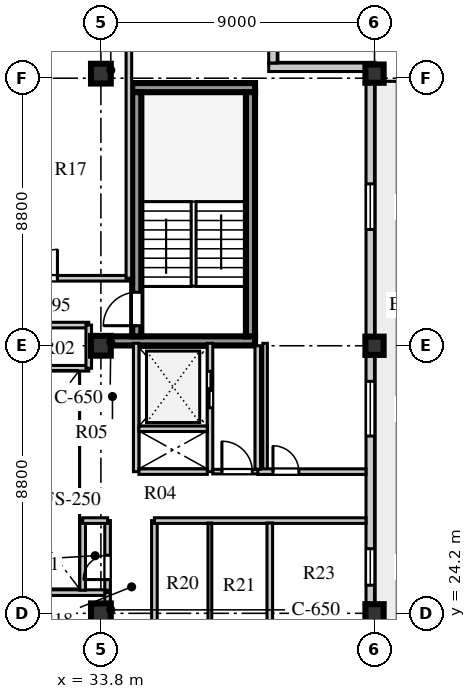
"""IFC4 building model, lengths in metres.
Left out: names, types, materials, properties, quantities, classifications, styles, units other than length and angle.
Written with IfcOpenShell. Run it as: python <this file> out.ifc"""

import sys

from ifc_helpers import new_model, si_unit, direction, frame, frame_2d, origin, origin_2d, place, context, subcontext, project, spatial, rectangle, extrude, element, fill, save


model = new_model("IFC4")
c1 = context("Model", 3, precision=1e-05, world=origin(), true_north=direction((0.0, 1.0)))
c2 = subcontext(c1, "Body", "Model", "MODEL_VIEW")
j1 = project(units=[si_unit("LENGTHUNIT", "METRE"), si_unit("PLANEANGLEUNIT", "RADIAN")], contexts=[c1])
p1 = place(None, origin())
s1 = spatial("IfcSite", under=j1, at=p1, CompositionType="ELEMENT")
p2 = place(p1, origin())
s2 = spatial("IfcBuilding", under=s1, at=p2, CompositionType="ELEMENT")
p3 = place(p2, frame((0.0, 0.0, 342.9)))
s3 = spatial("IfcBuildingStorey", under=s2, at=p3, CompositionType="ELEMENT", Elevation=342.9)
p4 = place(p3, frame((34.125, 33.16, 0.0), z_axis=(0.0, 0.0, 1.0), x_axis=(1.0, 0.0, 0.0)))
e1 = element("IfcWall", 1, at=p4, inside=s3, PredefinedType="SHEAR", context=c2, shape_type="SweptSolid", body=[
    extrude(rectangle(XDim=4.745, YDim=0.3, at=frame_2d((2.373, 0.0))), origin(), (0.0, 0.0, 1.0), 3.55),
])
p5 = place(p3, frame((34.83, 41.49, 0.0), z_axis=(0.0, 0.0, 1.0), x_axis=(1.0, 0.0, 0.0)))
e2 = element("IfcWall", 2, at=p5, inside=s3, PredefinedType="SHEAR", context=c2, shape_type="SweptSolid", body=[
    extrude(rectangle(XDim=4.04, YDim=0.3, at=frame_2d((2.02, 0.0))), origin(), (0.0, 0.0, 1.0), 3.55),
])
p6 = place(p3, frame((34.98, 33.31, 0.0), z_axis=(0.0, 0.0, 1.0), x_axis=(0.0, 1.0, 0.0)))
e3 = element("IfcWall", 3, at=p6, inside=s3, PredefinedType="SHEAR", context=c2, shape_type="SweptSolid", body=[
    extrude(rectangle(XDim=8.03, YDim=0.3, at=frame_2d((4.015, 0.0))), origin(), (0.0, 0.0, 1.0), 3.55),
])
p7 = place(p6, frame((0.35, 0.0, 0.0)))
e4 = element("IfcOpeningElement", 4, at=p7, cuts=e3, PredefinedType="OPENING", context=c2, shape_type="SweptSolid", body=[
    extrude(rectangle(XDim=1.1, YDim=2.1, at=frame_2d((0.55, 1.05))), frame((0.0, 0.16, 0.0), z_axis=(0.0, -1.0, 0.0), x_axis=(1.0, 0.0, 0.0)), (0.0, 0.0, 1.0), 0.32),
])
p8 = place(p3, frame((38.72, 33.31, 0.0), z_axis=(0.0, 0.0, 1.0), x_axis=(0.0, 1.0, 0.0)))
e5 = element("IfcWall", 5, at=p8, inside=s3, PredefinedType="SHEAR", context=c2, shape_type="SweptSolid", body=[
    extrude(rectangle(XDim=8.03, YDim=0.3, at=frame_2d((4.015, 0.0))), origin(), (0.0, 0.0, 1.0), 3.55),
])
for number, where, z_axis, x_axis in (
    (6, (33.8, 24.2, 0.0), (0.0, 0.0, 1.0), (1.0, 0.0, 0.0)),
    (7, (33.8, 33.0, 0.0), (0.0, 0.0, 1.0), (1.0, 0.0, 0.0)),
    (8, (33.8, 41.95, 0.0), (0.0, 0.0, 1.0), (1.0, 0.0, 0.0)),
):
    element("IfcColumn", number, at=place(p3, frame(where, z_axis=z_axis, x_axis=x_axis)), inside=s3, PredefinedType="COLUMN", context=c2, shape_type="SweptSolid", body=[
        extrude(rectangle(XDim=0.65, YDim=0.65, at=origin_2d()), origin(), (0.0, 0.0, 1.0), 3.55),
    ])
for number, where, z_axis, x_axis in (
    (9, (42.8, 24.2, 0.0), (0.0, 0.0, 1.0), (1.0, 0.0, 0.0)),
    (10, (42.8, 33.0, 0.0), (0.0, 0.0, 1.0), (1.0, 0.0, 0.0)),
    (11, (42.8, 41.95, 0.0), (0.0, 0.0, 1.0), (1.0, 0.0, 0.0)),
):
    element("IfcColumn", number, at=place(p3, frame(where, z_axis=z_axis, x_axis=x_axis)), inside=s3, PredefinedType="COLUMN", context=c2, shape_type="SweptSolid", body=[
        extrude(rectangle(XDim=0.6, YDim=0.6, at=origin_2d()), origin(), (0.0, 0.0, 1.0), 3.55),
    ])
p9 = place(p3, frame((42.66, 15.18, 0.0), z_axis=(0.0, 0.0, 1.0), x_axis=(0.0, 1.0, 0.0)))
e12 = element("IfcWall", 12, at=p9, inside=s3, PredefinedType="STANDARD", context=c2, shape_type="SweptSolid", body=[
    extrude(rectangle(XDim=26.84, YDim=0.28, at=frame_2d((13.42, 0.0))), origin(), (0.0, 0.0, 1.0), 2.91),
])
p10 = place(p9, frame((0.67, 0.0, 0.0)))
e13 = element("IfcOpeningElement", 13, at=p10, cuts=e12, PredefinedType="OPENING", context=c2, shape_type="SweptSolid", body=[
    extrude(rectangle(XDim=1.2, YDim=2.05, at=frame_2d((0.6, 1.025))), frame((0.0, 0.15, 0.0), z_axis=(0.0, -1.0, 0.0), x_axis=(1.0, 0.0, 0.0)), (0.0, 0.0, 1.0), 0.3),
])
p11 = place(p9, frame((2.93, 0.0, 0.8)))
e14 = element("IfcOpeningElement", 14, at=p11, cuts=e12, PredefinedType="OPENING", context=c2, shape_type="SweptSolid", body=[
    extrude(rectangle(XDim=1.65, YDim=1.95, at=frame_2d((0.825, 0.975))), frame((0.0, 0.15, 0.0), z_axis=(0.0, -1.0, 0.0), x_axis=(1.0, 0.0, 0.0)), (0.0, 0.0, 1.0), 0.3),
])
p12 = place(p9, frame((6.855, 0.0, 0.8)))
e15 = element("IfcOpeningElement", 15, at=p12, cuts=e12, PredefinedType="OPENING", context=c2, shape_type="SweptSolid", body=[
    extrude(rectangle(XDim=1.2, YDim=1.75, at=frame_2d((0.6, 0.875))), frame((0.0, 0.15, 0.0), z_axis=(0.0, -1.0, 0.0), x_axis=(1.0, 0.0, 0.0)), (0.0, 0.0, 1.0), 0.3),
])
p13 = place(p9, frame((9.945, 0.0, 0.8)))
e16 = element("IfcOpeningElement", 16, at=p13, cuts=e12, PredefinedType="OPENING", context=c2, shape_type="SweptSolid", body=[
    extrude(rectangle(XDim=1.2, YDim=1.75, at=frame_2d((0.6, 0.875))), frame((0.0, 0.15, 0.0), z_axis=(0.0, -1.0, 0.0), x_axis=(1.0, 0.0, 0.0)), (0.0, 0.0, 1.0), 0.3),
])
p14 = place(p9, frame((14.85, 0.0, 0.8)))
e17 = element("IfcOpeningElement", 17, at=p14, cuts=e12, PredefinedType="OPENING", context=c2, shape_type="SweptSolid", body=[
    extrude(rectangle(XDim=1.8, YDim=2.0, at=frame_2d((0.9, 1.0))), frame((0.0, 0.15, 0.0), z_axis=(0.0, -1.0, 0.0), x_axis=(1.0, 0.0, 0.0)), (0.0, 0.0, 1.0), 0.3),
])
p15 = place(p9, frame((21.645, 0.0, 0.8)))
e18 = element("IfcOpeningElement", 18, at=p15, cuts=e12, PredefinedType="OPENING", context=c2, shape_type="SweptSolid", body=[
    extrude(rectangle(XDim=1.5, YDim=2.0, at=frame_2d((0.75, 1.0))), frame((0.0, 0.15, 0.0), z_axis=(0.0, -1.0, 0.0), x_axis=(1.0, 0.0, 0.0)), (0.0, 0.0, 1.0), 0.3),
])
p16 = place(p3, frame((42.8, 42.16, 0.0), z_axis=(0.0, 0.0, 1.0), x_axis=(-1.0, 0.0, 0.0)))
e19 = element("IfcWall", 19, at=p16, inside=s3, PredefinedType="STANDARD", context=c2, shape_type="SweptSolid", body=[
    extrude(rectangle(XDim=3.48, YDim=0.28, at=frame_2d((1.74, 0.0))), origin(), (0.0, 0.0, 1.0), 2.91),
])
p17 = place(p3, frame((39.46, 42.3, 0.0), z_axis=(0.0, 0.0, 1.0), x_axis=(0.0, 1.0, 0.0)))
e20 = element("IfcWall", 20, at=p17, inside=s3, PredefinedType="STANDARD", context=c2, shape_type="SweptSolid", body=[
    extrude(rectangle(XDim=2.92, YDim=0.28, at=frame_2d((1.46, 0.0))), origin(), (0.0, 0.0, 1.0), 2.91),
])
p18 = place(p3, frame((34.96, 28.86, 0.0), z_axis=(0.0, 0.0, 1.0), x_axis=(0.0, 1.0, 0.0)))
e21 = element("IfcWall", 21, at=p18, inside=s3, PredefinedType="SOLIDWALL", context=c2, shape_type="SweptSolid", body=[
    extrude(rectangle(XDim=4.22, YDim=0.18, at=frame_2d((2.11, 0.0))), origin(), (0.0, 0.0, 1.0), 3.55),
])
p19 = place(p3, frame((37.39, 28.86, 0.0), z_axis=(0.0, 0.0, 1.0), x_axis=(0.0, 1.0, 0.0)))
e22 = element("IfcWall", 22, at=p19, inside=s3, PredefinedType="SOLIDWALL", context=c2, shape_type="SweptSolid", body=[
    extrude(rectangle(XDim=4.22, YDim=0.18, at=frame_2d((2.11, 0.0))), origin(), (0.0, 0.0, 1.0), 3.55),
])
p20 = place(p19, frame((2.1, 0.0, 0.0)))
e23 = element("IfcOpeningElement", 23, at=p20, cuts=e22, PredefinedType="OPENING", context=c2, shape_type="SweptSolid", body=[
    extrude(rectangle(XDim=1.2, YDim=2.12, at=frame_2d((0.6, 1.06))), frame((0.0, 0.1, 0.0), z_axis=(0.0, -1.0, 0.0), x_axis=(1.0, 0.0, 0.0)), (0.0, 0.0, 1.0), 0.2),
])
for number, where, z_axis, x_axis in (
    (24, (35.05, 28.86, 0.0), (0.0, 0.0, 1.0), (1.0, 0.0, 0.0)),
    (25, (35.05, 30.27, 0.0), (0.0, 0.0, 1.0), (1.0, 0.0, 0.0)),
):
    element("IfcWall", number, at=place(p3, frame(where, z_axis=z_axis, x_axis=x_axis)), inside=s3, PredefinedType="SOLIDWALL", context=c2, shape_type="SweptSolid", body=[
        extrude(rectangle(XDim=2.25, YDim=0.18, at=frame_2d((1.125, 0.0))), origin(), (0.0, 0.0, 1.0), 3.55),
    ])
p21 = place(p3, frame((39.2, 28.86, 0.0), z_axis=(0.0, 0.0, 1.0), x_axis=(0.0, 1.0, 0.0)))
e26 = element("IfcWall", 26, at=p21, inside=s3, PredefinedType="PARTITIONING", context=c2, shape_type="SweptSolid", body=[
    extrude(rectangle(XDim=4.22, YDim=0.15, at=frame_2d((2.11, 0.0))), origin(), (0.0, 0.0, 1.0), 3.55),
])
p22 = place(p3, frame((37.48, 28.86, 0.0), z_axis=(0.0, 0.0, 1.0), x_axis=(1.0, 0.0, 0.0)))
e27 = element("IfcWall", 27, at=p22, inside=s3, PredefinedType="PARTITIONING", context=c2, shape_type="SweptSolid", body=[
    extrude(rectangle(XDim=1.64, YDim=0.15, at=frame_2d((0.82, 0.0))), origin(), (0.0, 0.0, 1.0), 3.55),
])
p23 = place(p22, frame((0.3, 0.0, 0.0)))
e28 = element("IfcOpeningElement", 28, at=p23, cuts=e27, PredefinedType="OPENING", context=c2, shape_type="SweptSolid", body=[
    extrude(rectangle(XDim=1.0, YDim=2.1, at=frame_2d((0.5, 1.05))), frame((0.0, 0.085, 0.0), z_axis=(0.0, -1.0, 0.0), x_axis=(1.0, 0.0, 0.0)), (0.0, 0.0, 1.0), 0.17),
])
p24 = place(p3, frame((25.22, 35.22, 0.0), z_axis=(0.0, 0.0, 1.0), x_axis=(1.0, 0.0, 0.0)))
e29 = element("IfcWall", 29, at=p24, inside=s3, PredefinedType="SOLIDWALL", context=c2, shape_type="SweptSolid", body=[
    extrude(rectangle(XDim=9.5, YDim=0.185, at=frame_2d((4.75, 0.0))), origin(), (0.0, 0.0, 1.0), 3.55),
])
p25 = place(p24, frame((2.4, 0.0, 0.0)))
e30 = element("IfcOpeningElement", 30, at=p25, cuts=e29, PredefinedType="OPENING", context=c2, shape_type="SweptSolid", body=[
    extrude(rectangle(XDim=0.95, YDim=2.08, at=frame_2d((0.475, 1.04))), frame((0.0, 0.103, 0.0), z_axis=(0.0, -1.0, 0.0), x_axis=(1.0, 0.0, 0.0)), (0.0, 0.0, 1.0), 0.205),
])
p26 = place(p24, frame((6.2, 0.0, 0.0)))
e31 = element("IfcOpeningElement", 31, at=p26, cuts=e29, PredefinedType="OPENING", context=c2, shape_type="SweptSolid", body=[
    extrude(rectangle(XDim=0.95, YDim=2.08, at=frame_2d((0.475, 1.04))), frame((0.0, 0.103, 0.0), z_axis=(0.0, -1.0, 0.0), x_axis=(1.0, 0.0, 0.0)), (0.0, 0.0, 1.0), 0.205),
])
p27 = place(p3, frame((34.72, 35.22, 0.0), z_axis=(0.0, 0.0, 1.0), x_axis=(0.0, 1.0, 0.0)))
e32 = element("IfcWall", 32, at=p27, inside=s3, PredefinedType="SOLIDWALL", context=c2, shape_type="SweptSolid", body=[
    extrude(rectangle(XDim=10.0, YDim=0.185, at=frame_2d((5.0, 0.0))), origin(), (0.0, 0.0, 1.0), 3.55),
])
p28 = place(p3, frame((35.56, 15.18, 0.0), z_axis=(0.0, 0.0, 1.0), x_axis=(0.0, 1.0, 0.0)))
e33 = element("IfcWall", 33, at=p28, inside=s3, PredefinedType="SOLIDWALL", context=c2, shape_type="SweptSolid", body=[
    extrude(rectangle(XDim=12.07, YDim=0.185, at=frame_2d((6.035, 0.0))), origin(), (0.0, 0.0, 1.0), 3.55),
])
p29 = place(p28, frame((6.87, 0.0, 0.0)))
e34 = element("IfcOpeningElement", 34, at=p29, cuts=e33, PredefinedType="OPENING", context=c2, shape_type="SweptSolid", body=[
    extrude(rectangle(XDim=0.95, YDim=2.1, at=frame_2d((0.475, 1.05))), frame((0.0, 0.103, 0.0), z_axis=(0.0, -1.0, 0.0), x_axis=(1.0, 0.0, 0.0)), (0.0, 0.0, 1.0), 0.205),
])
p30 = place(p3, frame((35.56, 27.25, 0.0), z_axis=(0.0, 0.0, 1.0), x_axis=(1.0, 0.0, 0.0)))
e35 = element("IfcWall", 35, at=p30, inside=s3, PredefinedType="SOLIDWALL", context=c2, shape_type="SweptSolid", body=[
    extrude(rectangle(XDim=6.96, YDim=0.185, at=frame_2d((3.48, 0.0))), origin(), (0.0, 0.0, 1.0), 3.55),
])
p31 = place(p3, frame((39.355, 15.26, 0.0), z_axis=(0.0, 0.0, 1.0), x_axis=(0.0, 1.0, 0.0)))
e36 = element("IfcWall", 36, at=p31, inside=s3, PredefinedType="SOLIDWALL", context=c2, shape_type="SweptSolid", body=[
    extrude(rectangle(XDim=11.91, YDim=0.185, at=frame_2d((5.955, 0.0))), origin(), (0.0, 0.0, 1.0), 3.55),
])
p32 = place(p31, frame((4.76, 0.0, 0.0)))
e37 = element("IfcOpeningElement", 37, at=p32, cuts=e36, PredefinedType="OPENING", context=c2, shape_type="SweptSolid", body=[
    extrude(rectangle(XDim=0.85, YDim=2.08, at=frame_2d((0.425, 1.04))), frame((0.0, 0.103, 0.0), z_axis=(0.0, -1.0, 0.0), x_axis=(1.0, 0.0, 0.0)), (0.0, 0.0, 1.0), 0.205),
])
p33 = place(p31, frame((6.06, 0.0, 0.0)))
e38 = element("IfcOpeningElement", 38, at=p33, cuts=e36, PredefinedType="OPENING", context=c2, shape_type="SweptSolid", body=[
    extrude(rectangle(XDim=0.85, YDim=2.08, at=frame_2d((0.425, 1.04))), frame((0.0, 0.103, 0.0), z_axis=(0.0, -1.0, 0.0), x_axis=(1.0, 0.0, 0.0)), (0.0, 0.0, 1.0), 0.205),
])
p34 = place(p3, frame((37.385, 22.48, 0.0), z_axis=(0.0, 0.0, 1.0), x_axis=(0.0, 1.0, 0.0)))
e39 = element("IfcWall", 39, at=p34, inside=s3, PredefinedType="PLUMBINGWALL", context=c2, shape_type="SweptSolid", body=[
    extrude(rectangle(XDim=4.69, YDim=0.125, at=frame_2d((2.345, 0.0))), origin(), (0.0, 0.0, 1.0), 3.55),
])
p35 = place(p3, frame((38.96, 28.86, 0.0), z_axis=(0.0, 0.0, 1.0), x_axis=(1.0, 0.0, 0.0)))
e40 = element("IfcWall", 40, at=p35, inside=s3, PredefinedType="SOLIDWALL", context=c2, shape_type="SweptSolid", body=[
    extrude(rectangle(XDim=3.56, YDim=0.185, at=frame_2d((1.78, 0.0))), origin(), (0.0, 0.0, 1.0), 3.55),
])
p36 = place(p35, frame((0.5, 0.0, 0.0)))
e41 = element("IfcOpeningElement", 41, at=p36, cuts=e40, PredefinedType="OPENING", context=c2, shape_type="SweptSolid", body=[
    extrude(rectangle(XDim=0.85, YDim=2.05, at=frame_2d((0.425, 1.025))), frame((0.0, 0.103, 0.0), z_axis=(0.0, -1.0, 0.0), x_axis=(1.0, 0.0, 0.0)), (0.0, 0.0, 1.0), 0.205),
])
p37 = place(p3, frame((38.96, 28.94, 0.0), z_axis=(0.0, 0.0, 1.0), x_axis=(0.0, 1.0, 0.0)))
e42 = element("IfcWall", 42, at=p37, inside=s3, PredefinedType="SOLIDWALL", context=c2, shape_type="SweptSolid", body=[
    extrude(rectangle(XDim=4.06, YDim=0.185, at=frame_2d((2.03, 0.0))), origin(), (0.0, 0.0, 1.0), 3.55),
])
p38 = place(p3, frame((27.2, 24.88, 0.0), z_axis=(0.0, 0.0, 1.0), x_axis=(1.0, 0.0, 0.0)))
e43 = element("IfcWall", 43, at=p38, inside=s3, PredefinedType="SOLIDWALL", context=c2, shape_type="SweptSolid", body=[
    extrude(rectangle(XDim=6.82, YDim=0.185, at=frame_2d((3.41, 0.0))), origin(), (0.0, 0.0, 1.0), 3.0),
])
p39 = place(p3, frame((34.02, 23.42, 0.0), z_axis=(0.0, 0.0, 1.0), x_axis=(0.0, 1.0, 0.0)))
e44 = element("IfcWall", 44, at=p39, inside=s3, PredefinedType="SOLIDWALL", context=c2, shape_type="SweptSolid", body=[
    extrude(rectangle(XDim=1.46, YDim=0.185, at=frame_2d((0.73, 0.0))), origin(), (0.0, 0.0, 1.0), 2.95),
])
p40 = place(p3, frame((33.2, 24.96, 0.0), z_axis=(0.0, 0.0, 1.0), x_axis=(0.0, 1.0, 0.0)))
e45 = element("IfcWall", 45, at=p40, inside=s3, PredefinedType="SOLIDWALL", context=c2, shape_type="SweptSolid", body=[
    extrude(rectangle(XDim=2.29, YDim=0.185, at=frame_2d((1.145, 0.0))), origin(), (0.0, 0.0, 1.0), 3.0),
])
p41 = place(p3, frame((34.02, 24.96, 0.0), z_axis=(0.0, 0.0, 1.0), x_axis=(0.0, 1.0, 0.0)))
e46 = element("IfcWall", 46, at=p41, inside=s3, PredefinedType="SOLIDWALL", context=c2, shape_type="SweptSolid", body=[
    extrude(rectangle(XDim=2.29, YDim=0.185, at=frame_2d((1.145, 0.0))), origin(), (0.0, 0.0, 1.0), 2.95),
])
p42 = place(p41, frame((0.35, 0.0, 0.0)))
e47 = element("IfcOpeningElement", 47, at=p42, cuts=e46, PredefinedType="OPENING", context=c2, shape_type="SweptSolid", body=[
    extrude(rectangle(XDim=0.8, YDim=2.05, at=frame_2d((0.4, 1.025))), frame((0.0, 0.103, 0.0), z_axis=(0.0, -1.0, 0.0), x_axis=(1.0, 0.0, 0.0)), (0.0, 0.0, 1.0), 0.205),
])
p43 = place(p3, frame((33.2, 27.25, 0.0), z_axis=(0.0, 0.0, 1.0), x_axis=(1.0, 0.0, 0.0)))
e48 = element("IfcWall", 48, at=p43, inside=s3, PredefinedType="SOLIDWALL", context=c2, shape_type="SweptSolid", body=[
    extrude(rectangle(XDim=0.82, YDim=0.185, at=frame_2d((0.41, 0.0))), origin(), (0.0, 0.0, 1.0), 3.55),
])
p44 = place(p3, frame((27.2, 33.68, 0.0), z_axis=(0.0, 0.0, 1.0), x_axis=(1.0, 0.0, 0.0)))
e49 = element("IfcWall", 49, at=p44, inside=s3, PredefinedType="SOLIDWALL", context=c2, shape_type="SweptSolid", body=[
    extrude(rectangle(XDim=6.2, YDim=0.185, at=frame_2d((3.1, 0.0))), origin(), (0.0, 0.0, 1.0), 3.55),
])
p45 = place(p44, frame((1.2, 0.0, 0.0)))
e50 = element("IfcOpeningElement", 50, at=p45, cuts=e49, PredefinedType="OPENING", context=c2, shape_type="SweptSolid", body=[
    extrude(rectangle(XDim=0.8, YDim=2.05, at=frame_2d((0.4, 1.025))), frame((0.0, 0.103, 0.0), z_axis=(0.0, -1.0, 0.0), x_axis=(1.0, 0.0, 0.0)), (0.0, 0.0, 1.0), 0.205),
])
p46 = place(p3, frame((27.2, 32.26, 0.0), z_axis=(0.0, 0.0, 1.0), x_axis=(1.0, 0.0, 0.0)))
e51 = element("IfcWall", 51, at=p46, inside=s3, PredefinedType="SOLIDWALL", context=c2, shape_type="SweptSolid", body=[
    extrude(rectangle(XDim=6.2, YDim=0.185, at=frame_2d((3.1, 0.0))), origin(), (0.0, 0.0, 1.0), 3.0),
])
p47 = place(p3, frame((33.4, 32.26, 0.0), z_axis=(0.0, 0.0, 1.0), x_axis=(0.0, 1.0, 0.0)))
e52 = element("IfcWall", 52, at=p47, inside=s3, PredefinedType="SOLIDWALL", context=c2, shape_type="SweptSolid", body=[
    extrude(rectangle(XDim=1.42, YDim=0.185, at=frame_2d((0.71, 0.0))), origin(), (0.0, 0.0, 1.0), 3.0),
])
p48 = place(p13, origin())
e53 = element("IfcWindow", 53, at=p48, inside=s3, PartitioningType="SINGLE_PANEL", PredefinedType="WINDOW", context=c2, shape_type="SweptSolid", body=[
    extrude(rectangle(XDim=1.2, YDim=1.75, at=frame_2d((0.6, 0.875))), frame((0.0, 0.03, 0.0), z_axis=(0.0, -1.0, 0.0), x_axis=(1.0, 0.0, 0.0)), (0.0, 0.0, 1.0), 0.06),
])
fill(e16, e53)
p49 = place(p14, origin())
e54 = element("IfcWindow", 54, at=p49, inside=s3, PartitioningType="SINGLE_PANEL", PredefinedType="WINDOW", context=c2, shape_type="SweptSolid", body=[
    extrude(rectangle(XDim=1.8, YDim=2.0, at=frame_2d((0.9, 1.0))), frame((0.0, 0.03, 0.0), z_axis=(0.0, -1.0, 0.0), x_axis=(1.0, 0.0, 0.0)), (0.0, 0.0, 1.0), 0.06),
])
fill(e17, e54)
p50 = place(p15, origin())
e55 = element("IfcWindow", 55, at=p50, inside=s3, PartitioningType="SINGLE_PANEL", PredefinedType="WINDOW", context=c2, shape_type="SweptSolid", body=[
    extrude(rectangle(XDim=1.5, YDim=2.0, at=frame_2d((0.75, 1.0))), frame((0.0, 0.03, 0.0), z_axis=(0.0, -1.0, 0.0), x_axis=(1.0, 0.0, 0.0)), (0.0, 0.0, 1.0), 0.06),
])
fill(e18, e55)
p51 = place(p7, origin())
e56 = element("IfcDoor", 56, at=p51, inside=s3, OperationType="SINGLE_SWING_LEFT", PredefinedType="DOOR", context=c2, shape_type="SweptSolid", body=[
    extrude(rectangle(XDim=1.1, YDim=2.1, at=frame_2d((0.55, 1.05))), frame((0.0, 0.025, 0.0), z_axis=(0.0, -1.0, 0.0), x_axis=(1.0, 0.0, 0.0)), (0.0, 0.0, 1.0), 0.05),
])
fill(e4, e56)
p52 = place(p20, frame((1.2, 0.0, 0.0), z_axis=(0.0, 0.0, 1.0), x_axis=(-1.0, 0.0, 0.0)))
e57 = element("IfcDoor", 57, at=p52, inside=s3, OperationType="DOUBLE_DOOR_SLIDING", PredefinedType="DOOR", context=c2, shape_type="SweptSolid", body=[
    extrude(rectangle(XDim=1.2, YDim=2.12, at=frame_2d((0.6, 1.06))), frame((0.0, 0.025, 0.0), z_axis=(0.0, -1.0, 0.0), x_axis=(1.0, 0.0, 0.0)), (0.0, 0.0, 1.0), 0.05),
])
fill(e23, e57)
p53 = place(p23, origin())
e58 = element("IfcDoor", 58, at=p53, inside=s3, OperationType="SINGLE_SWING_LEFT", PredefinedType="DOOR", context=c2, shape_type="SweptSolid", body=[
    extrude(rectangle(XDim=1.0, YDim=2.1, at=frame_2d((0.5, 1.05))), frame((0.0, 0.025, 0.0), z_axis=(0.0, -1.0, 0.0), x_axis=(1.0, 0.0, 0.0)), (0.0, 0.0, 1.0), 0.05),
])
fill(e28, e58)
p54 = place(p26, origin())
e59 = element("IfcDoor", 59, at=p54, inside=s3, OperationType="SINGLE_SWING_RIGHT", PredefinedType="DOOR", context=c2, shape_type="SweptSolid", body=[
    extrude(rectangle(XDim=0.95, YDim=2.08, at=frame_2d((0.475, 1.04))), frame((0.0, 0.025, 0.0), z_axis=(0.0, -1.0, 0.0), x_axis=(1.0, 0.0, 0.0)), (0.0, 0.0, 1.0), 0.05),
])
fill(e31, e59)
p55 = place(p36, origin())
e60 = element("IfcDoor", 60, at=p55, inside=s3, OperationType="SINGLE_SWING_LEFT", PredefinedType="DOOR", context=c2, shape_type="SweptSolid", body=[
    extrude(rectangle(XDim=0.85, YDim=2.05, at=frame_2d((0.425, 1.025))), frame((0.0, 0.025, 0.0), z_axis=(0.0, -1.0, 0.0), x_axis=(1.0, 0.0, 0.0)), (0.0, 0.0, 1.0), 0.05),
])
fill(e41, e60)
p56 = place(p42, origin())
e61 = element("IfcDoor", 61, at=p56, inside=s3, OperationType="SINGLE_SWING_LEFT", PredefinedType="DOOR", context=c2, shape_type="SweptSolid", body=[
    extrude(rectangle(XDim=0.8, YDim=2.05, at=frame_2d((0.4, 1.025))), frame((0.0, 0.025, 0.0), z_axis=(0.0, -1.0, 0.0), x_axis=(1.0, 0.0, 0.0)), (0.0, 0.0, 1.0), 0.05),
])
fill(e47, e61)
save(model, sys.argv[1])
